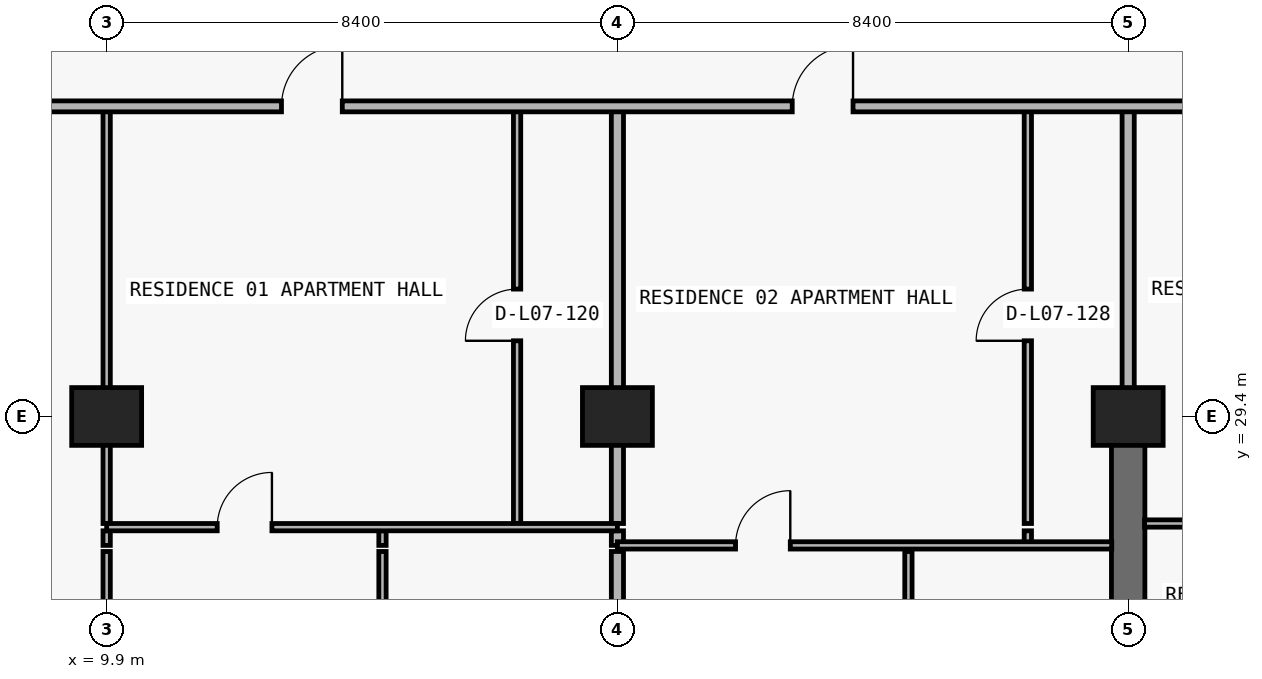
"""IFC4 building model, lengths in metres.
Left out: names, types, materials, properties, quantities, classifications, styles, units other than length and angle.
Written with IfcOpenShell. Run it as: python <this file> out.ifc"""

import sys

from ifc_helpers import new_model, si_unit, direction, frame, frame_2d, origin, origin_2d, place, context, subcontext, project, spatial, rectangle, extrude, element, fill, save


model = new_model("IFC4")
c1 = context("Model", 3, precision=1e-05, world=origin(), true_north=direction((0.0, 1.0)))
c2 = subcontext(c1, "Body", "Model", "MODEL_VIEW")
j1 = project(units=[si_unit("LENGTHUNIT", "METRE"), si_unit("PLANEANGLEUNIT", "RADIAN")], contexts=[c1])
p1 = place(None, origin())
s1 = spatial("IfcSite", under=j1, at=p1, CompositionType="ELEMENT")
p2 = place(p1, origin())
s2 = spatial("IfcBuilding", under=s1, at=p2, CompositionType="ELEMENT")
p3 = place(p2, frame((0.0, 0.0, 33.3)))
s3 = spatial("IfcBuildingStorey", under=s2, at=p3, CompositionType="ELEMENT", Elevation=33.3)
for number, where, z_axis, x_axis in (
    (1, (9.9, 29.4, 0.0), (0.0, 0.0, 1.0), (1.0, 0.0, 0.0)),
    (2, (18.3, 29.4, 0.0), (0.0, 0.0, 1.0), (1.0, 0.0, 0.0)),
    (3, (26.7, 29.4, 0.0), (0.0, 0.0, 1.0), (1.0, 0.0, 0.0)),
):
    element("IfcColumn", number, at=place(p3, frame(where, z_axis=z_axis, x_axis=x_axis)), inside=s3, PredefinedType="COLUMN", context=c2, shape_type="SweptSolid", body=[
        extrude(rectangle(XDim=1.15, YDim=0.95, at=origin_2d()), origin(), (0.0, 0.0, 1.0), 3.05),
    ])
p4 = place(p3, frame((26.7, 20.8, 0.0), z_axis=(0.0, 0.0, 1.0), x_axis=(0.0, 1.0, 0.0)))
e4 = element("IfcWall", 4, at=p4, inside=s3, PredefinedType="SHEAR", context=c2, shape_type="SweptSolid", body=[
    extrude(rectangle(XDim=8.6, YDim=0.55, at=frame_2d((4.3, 0.0))), origin(), (0.0, 0.0, 1.0), 3.05),
])
p5 = place(p3, frame((9.9, 22.49, 0.0), z_axis=(0.0, 0.0, 1.0), x_axis=(0.0, 1.0, 0.0)))
e5 = element("IfcWall", 5, at=p5, inside=s3, PredefinedType="PARTITIONING", context=c2, shape_type="SweptSolid", body=[
    extrude(rectangle(XDim=4.69, YDim=0.12, at=frame_2d((2.345, 0.0))), origin(), (0.0, 0.0, 1.0), 2.11),
])
p6 = place(p5, frame((1.895, 0.0, 0.0)))
e6 = element("IfcOpeningElement", 6, at=p6, cuts=e5, PredefinedType="OPENING", context=c2, shape_type="SweptSolid", body=[
    extrude(rectangle(XDim=0.9, YDim=2.06, at=frame_2d((0.45, 1.03))), frame((0.0, 0.07, 0.0), z_axis=(0.0, -1.0, 0.0), x_axis=(1.0, 0.0, 0.0)), (0.0, 0.0, 1.0), 0.14),
])
p7 = place(p3, frame((9.9, 27.28, 0.0), z_axis=(0.0, 0.0, 1.0), x_axis=(0.0, 1.0, 0.0)))
e7 = element("IfcWall", 7, at=p7, inside=s3, PredefinedType="PARTITIONING", context=c2, shape_type="SweptSolid", body=[
    extrude(rectangle(XDim=0.24, YDim=0.12, at=frame_2d((0.12, 0.0))), origin(), (0.0, 0.0, 1.0), 2.11),
])
p8 = place(p3, frame((9.9, 27.64, 0.0), z_axis=(0.0, 0.0, 1.0), x_axis=(0.0, 1.0, 0.0)))
e8 = element("IfcWall", 8, at=p8, inside=s3, PredefinedType="PARTITIONING", context=c2, shape_type="SweptSolid", body=[
    extrude(rectangle(XDim=6.86, YDim=0.12, at=frame_2d((3.43, 0.0))), origin(), (0.0, 0.0, 1.0), 2.11),
])
p9 = place(p3, frame((14.436, 22.49, 0.0), z_axis=(0.0, 0.0, 1.0), x_axis=(0.0, 1.0, 0.0)))
e9 = element("IfcWall", 9, at=p9, inside=s3, PredefinedType="PARTITIONING", context=c2, shape_type="SweptSolid", body=[
    extrude(rectangle(XDim=4.69, YDim=0.12, at=frame_2d((2.345, 0.0))), origin(), (0.0, 0.0, 1.0), 3.05),
])
p10 = place(p9, frame((1.895, 0.0, 0.0)))
e10 = element("IfcOpeningElement", 10, at=p10, cuts=e9, PredefinedType="OPENING", context=c2, shape_type="SweptSolid", body=[
    extrude(rectangle(XDim=0.9, YDim=2.15, at=frame_2d((0.45, 1.075))), frame((0.0, 0.07, 0.0), z_axis=(0.0, -1.0, 0.0), x_axis=(1.0, 0.0, 0.0)), (0.0, 0.0, 1.0), 0.14),
])
p11 = place(p3, frame((14.436, 27.28, 0.0), z_axis=(0.0, 0.0, 1.0), x_axis=(0.0, 1.0, 0.0)))
e11 = element("IfcWall", 11, at=p11, inside=s3, PredefinedType="PARTITIONING", context=c2, shape_type="SweptSolid", body=[
    extrude(rectangle(XDim=0.24, YDim=0.12, at=frame_2d((0.12, 0.0))), origin(), (0.0, 0.0, 1.0), 3.05),
])
p12 = place(p3, frame((16.65, 27.64, 0.0), z_axis=(0.0, 0.0, 1.0), x_axis=(0.0, 1.0, 0.0)))
e12 = element("IfcWall", 12, at=p12, inside=s3, PredefinedType="PARTITIONING", context=c2, shape_type="SweptSolid", body=[
    extrude(rectangle(XDim=6.86, YDim=0.12, at=frame_2d((3.43, 0.0))), origin(), (0.0, 0.0, 1.0), 3.05),
])
p13 = place(p12, frame((3.005, 0.0, 0.0)))
e13 = element("IfcOpeningElement", 13, at=p13, cuts=e12, PredefinedType="OPENING", context=c2, shape_type="SweptSolid", body=[
    extrude(rectangle(XDim=0.85, YDim=2.1, at=frame_2d((0.425, 1.05))), frame((0.0, 0.07, 0.0), z_axis=(0.0, -1.0, 0.0), x_axis=(1.0, 0.0, 0.0)), (0.0, 0.0, 1.0), 0.14),
])
p14 = place(p3, frame((18.3, 22.49, 0.0), z_axis=(0.0, 0.0, 1.0), x_axis=(0.0, 1.0, 0.0)))
e14 = element("IfcWall", 14, at=p14, inside=s3, PredefinedType="PARTITIONING", context=c2, shape_type="SweptSolid", body=[
    extrude(rectangle(XDim=4.69, YDim=0.2, at=frame_2d((2.345, 0.0))), origin(), (0.0, 0.0, 1.0), 2.11),
])
p15 = place(p3, frame((18.3, 27.28, 0.0), z_axis=(0.0, 0.0, 1.0), x_axis=(0.0, 1.0, 0.0)))
e15 = element("IfcWall", 15, at=p15, inside=s3, PredefinedType="PARTITIONING", context=c2, shape_type="SweptSolid", body=[
    extrude(rectangle(XDim=0.24, YDim=0.2, at=frame_2d((0.12, 0.0))), origin(), (0.0, 0.0, 1.0), 2.11),
])
p16 = place(p3, frame((18.3, 27.64, 0.0), z_axis=(0.0, 0.0, 1.0), x_axis=(0.0, 1.0, 0.0)))
e16 = element("IfcWall", 16, at=p16, inside=s3, PredefinedType="PARTITIONING", context=c2, shape_type="SweptSolid", body=[
    extrude(rectangle(XDim=6.86, YDim=0.2, at=frame_2d((3.43, 0.0))), origin(), (0.0, 0.0, 1.0), 2.11),
])
p17 = place(p3, frame((23.086, 22.49, 0.0), z_axis=(0.0, 0.0, 1.0), x_axis=(0.0, 1.0, 0.0)))
e17 = element("IfcWall", 17, at=p17, inside=s3, PredefinedType="PARTITIONING", context=c2, shape_type="SweptSolid", body=[
    extrude(rectangle(XDim=4.69, YDim=0.12, at=frame_2d((2.345, 0.0))), origin(), (0.0, 0.0, 1.0), 3.05),
])
p18 = place(p17, frame((1.895, 0.0, 0.0)))
e18 = element("IfcOpeningElement", 18, at=p18, cuts=e17, PredefinedType="OPENING", context=c2, shape_type="SweptSolid", body=[
    extrude(rectangle(XDim=0.9, YDim=2.15, at=frame_2d((0.45, 1.075))), frame((0.0, 0.07, 0.0), z_axis=(0.0, -1.0, 0.0), x_axis=(1.0, 0.0, 0.0)), (0.0, 0.0, 1.0), 0.14),
])
p19 = place(p3, frame((25.05, 27.28, 0.0), z_axis=(0.0, 0.0, 1.0), x_axis=(0.0, 1.0, 0.0)))
e19 = element("IfcWall", 19, at=p19, inside=s3, PredefinedType="PARTITIONING", context=c2, shape_type="SweptSolid", body=[
    extrude(rectangle(XDim=0.24, YDim=0.12, at=frame_2d((0.12, 0.0))), origin(), (0.0, 0.0, 1.0), 3.05),
])
p20 = place(p3, frame((25.05, 27.64, 0.0), z_axis=(0.0, 0.0, 1.0), x_axis=(0.0, 1.0, 0.0)))
e20 = element("IfcWall", 20, at=p20, inside=s3, PredefinedType="PARTITIONING", context=c2, shape_type="SweptSolid", body=[
    extrude(rectangle(XDim=6.86, YDim=0.12, at=frame_2d((3.43, 0.0))), origin(), (0.0, 0.0, 1.0), 3.05),
])
p21 = place(p20, frame((3.005, 0.0, 0.0)))
e21 = element("IfcOpeningElement", 21, at=p21, cuts=e20, PredefinedType="OPENING", context=c2, shape_type="SweptSolid", body=[
    extrude(rectangle(XDim=0.85, YDim=2.1, at=frame_2d((0.425, 1.05))), frame((0.0, 0.07, 0.0), z_axis=(0.0, -1.0, 0.0), x_axis=(1.0, 0.0, 0.0)), (0.0, 0.0, 1.0), 0.14),
])
p22 = place(p3, frame((26.7, 29.405, 0.0), z_axis=(0.0, 0.0, 1.0), x_axis=(0.0, 1.0, 0.0)))
e22 = element("IfcWall", 22, at=p22, inside=s3, PredefinedType="PARTITIONING", context=c2, shape_type="SweptSolid", body=[
    extrude(rectangle(XDim=5.095, YDim=0.2, at=frame_2d((2.547, 0.0))), origin(), (0.0, 0.0, 1.0), 2.335),
])
p23 = place(p3, frame((18.3, 27.28, 0.0), z_axis=(0.0, 0.0, 1.0), x_axis=(1.0, 0.0, 0.0)))
e23 = element("IfcWall", 23, at=p23, inside=s3, PredefinedType="PARTITIONING", context=c2, shape_type="SweptSolid", body=[
    extrude(rectangle(XDim=8.13, YDim=0.12, at=frame_2d((4.065, 0.0))), origin(), (0.0, 0.0, 1.0), 3.05),
])
p24 = place(p23, frame((1.943, 0.0, 0.0)))
e24 = element("IfcOpeningElement", 24, at=p24, cuts=e23, PredefinedType="OPENING", context=c2, shape_type="SweptSolid", body=[
    extrude(rectangle(XDim=0.9, YDim=2.15, at=frame_2d((0.45, 1.075))), frame((0.0, 0.07, 0.0), z_axis=(0.0, -1.0, 0.0), x_axis=(1.0, 0.0, 0.0)), (0.0, 0.0, 1.0), 0.14),
])
p25 = place(p3, frame((9.9, 27.58, 0.0), z_axis=(0.0, 0.0, 1.0), x_axis=(1.0, 0.0, 0.0)))
e25 = element("IfcWall", 25, at=p25, inside=s3, PredefinedType="PARTITIONING", context=c2, shape_type="SweptSolid", body=[
    extrude(rectangle(XDim=8.4, YDim=0.12, at=frame_2d((4.2, 0.0))), origin(), (0.0, 0.0, 1.0), 3.05),
])
p26 = place(p25, frame((1.818, 0.0, 0.0)))
e26 = element("IfcOpeningElement", 26, at=p26, cuts=e25, PredefinedType="OPENING", context=c2, shape_type="SweptSolid", body=[
    extrude(rectangle(XDim=0.9, YDim=2.15, at=frame_2d((0.45, 1.075))), frame((0.0, 0.07, 0.0), z_axis=(0.0, -1.0, 0.0), x_axis=(1.0, 0.0, 0.0)), (0.0, 0.0, 1.0), 0.14),
])
p27 = place(p3, frame((26.97, 27.64, 0.0), z_axis=(0.0, 0.0, 1.0), x_axis=(1.0, 0.0, 0.0)))
e27 = element("IfcWall", 27, at=p27, inside=s3, PredefinedType="PARTITIONING", context=c2, shape_type="SweptSolid", body=[
    extrude(rectangle(XDim=8.13, YDim=0.12, at=frame_2d((4.065, 0.0))), origin(), (0.0, 0.0, 1.0), 3.05),
])
p28 = place(p27, frame((1.558, 0.0, 0.0)))
e28 = element("IfcOpeningElement", 28, at=p28, cuts=e27, PredefinedType="OPENING", context=c2, shape_type="SweptSolid", body=[
    extrude(rectangle(XDim=0.9, YDim=2.15, at=frame_2d((0.45, 1.075))), frame((0.0, 0.07, 0.0), z_axis=(0.0, -1.0, 0.0), x_axis=(1.0, 0.0, 0.0)), (0.0, 0.0, 1.0), 0.14),
])
p29 = place(p3, frame((5.105, 34.5, 0.0), z_axis=(0.0, 0.0, 1.0), x_axis=(1.0, 0.0, 0.0)))
e29 = element("IfcWall", 29, at=p29, inside=s3, PredefinedType="PARTITIONING", context=c2, shape_type="SweptSolid", body=[
    extrude(rectangle(XDim=50.781, YDim=0.18, at=frame_2d((25.391, 0.0))), origin(), (0.0, 0.0, 1.0), 3.05),
])
p30 = place(p29, frame((7.67, 0.0, 0.0)))
e30 = element("IfcOpeningElement", 30, at=p30, cuts=e29, PredefinedType="OPENING", context=c2, shape_type="SweptSolid", body=[
    extrude(rectangle(XDim=1.0, YDim=2.2, at=frame_2d((0.5, 1.1))), frame((0.0, 0.1, 0.0), z_axis=(0.0, -1.0, 0.0), x_axis=(1.0, 0.0, 0.0)), (0.0, 0.0, 1.0), 0.2),
])
p31 = place(p29, frame((16.07, 0.0, 0.0)))
e31 = element("IfcOpeningElement", 31, at=p31, cuts=e29, PredefinedType="OPENING", context=c2, shape_type="SweptSolid", body=[
    extrude(rectangle(XDim=1.0, YDim=2.2, at=frame_2d((0.5, 1.1))), frame((0.0, 0.1, 0.0), z_axis=(0.0, -1.0, 0.0), x_axis=(1.0, 0.0, 0.0)), (0.0, 0.0, 1.0), 0.2),
])
p32 = place(p29, frame((24.47, 0.0, 0.0)))
e32 = element("IfcOpeningElement", 32, at=p32, cuts=e29, PredefinedType="OPENING", context=c2, shape_type="SweptSolid", body=[
    extrude(rectangle(XDim=1.0, YDim=2.2, at=frame_2d((0.5, 1.1))), frame((0.0, 0.1, 0.0), z_axis=(0.0, -1.0, 0.0), x_axis=(1.0, 0.0, 0.0)), (0.0, 0.0, 1.0), 0.2),
])
p33 = place(p29, frame((32.545, 0.0, 0.0)))
e33 = element("IfcOpeningElement", 33, at=p33, cuts=e29, PredefinedType="OPENING", context=c2, shape_type="SweptSolid", body=[
    extrude(rectangle(XDim=1.0, YDim=2.2, at=frame_2d((0.5, 1.1))), frame((0.0, 0.1, 0.0), z_axis=(0.0, -1.0, 0.0), x_axis=(1.0, 0.0, 0.0)), (0.0, 0.0, 1.0), 0.2),
])
p34 = place(p29, frame((47.888, 0.0, 0.0)))
e34 = element("IfcOpeningElement", 34, at=p34, cuts=e29, PredefinedType="OPENING", context=c2, shape_type="SweptSolid", body=[
    extrude(rectangle(XDim=1.0, YDim=2.2, at=frame_2d((0.5, 1.1))), frame((0.0, 0.1, 0.0), z_axis=(0.0, -1.0, 0.0), x_axis=(1.0, 0.0, 0.0)), (0.0, 0.0, 1.0), 0.2),
])
p35 = place(p30, origin())
e35 = element("IfcDoor", 35, at=p35, inside=s3, OperationType="SINGLE_SWING_RIGHT", PredefinedType="DOOR", context=c2, shape_type="SweptSolid", body=[
    extrude(rectangle(XDim=1.0, YDim=2.2, at=frame_2d((0.5, 1.1))), frame((0.0, 0.025, 0.0), z_axis=(0.0, -1.0, 0.0), x_axis=(1.0, 0.0, 0.0)), (0.0, 0.0, 1.0), 0.05),
])
fill(e30, e35)
p36 = place(p13, origin())
e36 = element("IfcDoor", 36, at=p36, inside=s3, OperationType="SINGLE_SWING_LEFT", PredefinedType="DOOR", context=c2, shape_type="SweptSolid", body=[
    extrude(rectangle(XDim=0.85, YDim=2.1, at=frame_2d((0.425, 1.05))), frame((0.0, 0.025, 0.0), z_axis=(0.0, -1.0, 0.0), x_axis=(1.0, 0.0, 0.0)), (0.0, 0.0, 1.0), 0.05),
])
fill(e13, e36)
p37 = place(p26, origin())
e37 = element("IfcDoor", 37, at=p37, inside=s3, OperationType="SINGLE_SWING_RIGHT", PredefinedType="DOOR", context=c2, shape_type="SweptSolid", body=[
    extrude(rectangle(XDim=0.9, YDim=2.15, at=frame_2d((0.45, 1.075))), frame((0.0, 0.025, 0.0), z_axis=(0.0, -1.0, 0.0), x_axis=(1.0, 0.0, 0.0)), (0.0, 0.0, 1.0), 0.05),
])
fill(e26, e37)
p38 = place(p31, origin())
e38 = element("IfcDoor", 38, at=p38, inside=s3, OperationType="SINGLE_SWING_RIGHT", PredefinedType="DOOR", context=c2, shape_type="SweptSolid", body=[
    extrude(rectangle(XDim=1.0, YDim=2.2, at=frame_2d((0.5, 1.1))), frame((0.0, 0.025, 0.0), z_axis=(0.0, -1.0, 0.0), x_axis=(1.0, 0.0, 0.0)), (0.0, 0.0, 1.0), 0.05),
])
fill(e31, e38)
p39 = place(p21, origin())
e39 = element("IfcDoor", 39, at=p39, inside=s3, OperationType="SINGLE_SWING_LEFT", PredefinedType="DOOR", context=c2, shape_type="SweptSolid", body=[
    extrude(rectangle(XDim=0.85, YDim=2.1, at=frame_2d((0.425, 1.05))), frame((0.0, 0.025, 0.0), z_axis=(0.0, -1.0, 0.0), x_axis=(1.0, 0.0, 0.0)), (0.0, 0.0, 1.0), 0.05),
])
fill(e21, e39)
p40 = place(p24, origin())
e40 = element("IfcDoor", 40, at=p40, inside=s3, OperationType="SINGLE_SWING_RIGHT", PredefinedType="DOOR", context=c2, shape_type="SweptSolid", body=[
    extrude(rectangle(XDim=0.9, YDim=2.15, at=frame_2d((0.45, 1.075))), frame((0.0, 0.025, 0.0), z_axis=(0.0, -1.0, 0.0), x_axis=(1.0, 0.0, 0.0)), (0.0, 0.0, 1.0), 0.05),
])
fill(e24, e40)
save(model, sys.argv[1])
